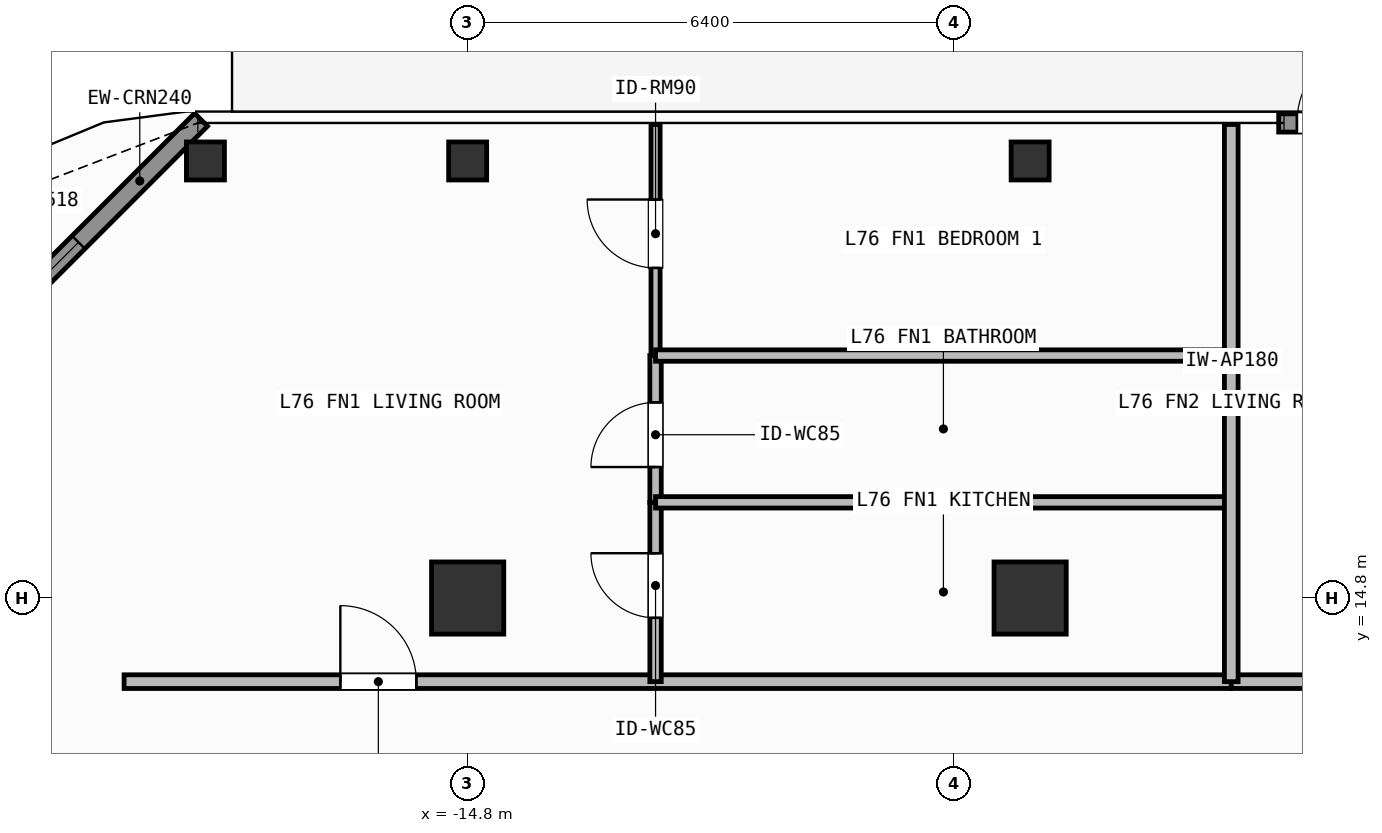
"""IFC4 building model, lengths in metres.
Left out: names, types, materials, properties, quantities, classifications, styles, units other than length and angle.
Written with IfcOpenShell. Run it as: python <this file> out.ifc"""

import sys

from ifc_helpers import new_model, si_unit, direction, frame, frame_2d, origin, origin_2d, place, context, subcontext, project, spatial, rectangle, hollow_rectangle, extrude, element, fill, save


model = new_model("IFC4")
c1 = context("Model", 3, precision=1e-05, world=origin(), true_north=direction((0.0, 1.0)))
c2 = subcontext(c1, "Body", "Model", "MODEL_VIEW")
j1 = project(units=[si_unit("LENGTHUNIT", "METRE"), si_unit("PLANEANGLEUNIT", "RADIAN")], contexts=[c1])
p1 = place(None, origin())
s1 = spatial("IfcSite", under=j1, at=p1, CompositionType="ELEMENT")
p2 = place(p1, origin())
s2 = spatial("IfcBuilding", under=s1, at=p2, CompositionType="ELEMENT")
p3 = place(p2, frame((0.0, 0.0, 309.3)))
s3 = spatial("IfcBuildingStorey", under=s2, at=p3, CompositionType="ELEMENT", Elevation=309.3)
for number, where, z_axis, x_axis in (
    (1, (-14.8, 14.8, 0.0), (0.0, 0.0, 1.0), (1.0, 0.0, 0.0)),
    (2, (-7.4, 14.8, 0.0), (0.0, 0.0, 1.0), (1.0, 0.0, 0.0)),
):
    element("IfcColumn", number, at=place(p3, frame(where, z_axis=z_axis, x_axis=x_axis)), inside=s3, PredefinedType="COLUMN", context=c2, shape_type="SweptSolid", body=[
        extrude(rectangle(XDim=0.95, YDim=0.95, at=origin_2d()), origin(), (0.0, 0.0, 1.0), 3.9),
    ])
for number, where, z_axis, x_axis in (
    (3, (-18.25, 20.55, 0.0), (0.0, 0.0, 1.0), (1.0, 0.0, 0.0)),
    (4, (-14.8, 20.55, 0.0), (0.0, 0.0, 1.0), (1.0, 0.0, 0.0)),
    (5, (-7.4, 20.55, 0.0), (0.0, 0.0, 1.0), (1.0, 0.0, 0.0)),
):
    element("IfcColumn", number, at=place(p3, frame(where, z_axis=z_axis, x_axis=x_axis)), inside=s3, PredefinedType="COLUMN", context=c2, shape_type="SweptSolid", body=[
        extrude(hollow_rectangle(XDim=0.5, YDim=0.5, WallThickness=0.025, at=origin_2d()), origin(), (0.0, 0.0, 1.0), 3.9),
    ])
p4 = place(p3, frame((-4.13, 21.05, 0.0), z_axis=(0.0, 0.0, 1.0), x_axis=(1.0, 0.0, 0.0)))
e6 = element("IfcWall", 6, at=p4, inside=s3, PredefinedType="SOLIDWALL", context=c2, shape_type="SweptSolid", body=[
    extrude(rectangle(XDim=1.58, YDim=0.24, at=frame_2d((0.79, 0.0))), origin(), (0.0, 0.0, 1.0), 3.64),
])
p5 = place(p4, frame((0.24, 0.0, 0.0)))
e7 = element("IfcOpeningElement", 7, at=p5, cuts=e6, PredefinedType="OPENING", context=c2, shape_type="SweptSolid", body=[
    extrude(rectangle(XDim=1.1, YDim=2.2, at=frame_2d((0.55, 1.1))), frame((0.0, 0.13, 0.0), z_axis=(0.0, -1.0, 0.0), x_axis=(1.0, 0.0, 0.0)), (0.0, 0.0, 1.0), 0.26),
])
p6 = place(p3, frame((-22.592, 16.808, 0.0), z_axis=(0.0, 0.0, 1.0), x_axis=(0.707106781187, 0.707106781187, 0.0)))
e8 = element("IfcWall", 8, at=p6, inside=s3, PredefinedType="SOLIDWALL", context=c2, shape_type="SweptSolid", body=[
    extrude(rectangle(XDim=6.059, YDim=0.24, at=frame_2d((3.03, 0.0))), origin(), (0.0, 0.0, 1.0), 3.64),
])
p7 = place(p6, frame((2.28, 0.0, 0.8)))
e9 = element("IfcOpeningElement", 9, at=p7, cuts=e8, PredefinedType="OPENING", context=c2, shape_type="SweptSolid", body=[
    extrude(rectangle(XDim=1.5, YDim=1.85, at=frame_2d((0.75, 0.925))), frame((0.0, 0.13, 0.0), z_axis=(0.0, -1.0, 0.0), x_axis=(1.0, 0.0, 0.0)), (0.0, 0.0, 1.0), 0.26),
])
p8 = place(p3, frame((-19.32, 13.7, 0.0), z_axis=(0.0, 0.0, 1.0), x_axis=(1.0, 0.0, 0.0)))
e10 = element("IfcWall", 10, at=p8, inside=s3, PredefinedType="PARTITIONING", context=c2, shape_type="SweptSolid", body=[
    extrude(rectangle(XDim=14.566, YDim=0.18, at=frame_2d((7.283, 0.0))), origin(), (0.0, 0.0, 1.0), 3.64),
])
p9 = place(p8, frame((2.845, 0.0, 0.0)))
e11 = element("IfcOpeningElement", 11, at=p9, cuts=e10, PredefinedType="OPENING", context=c2, shape_type="SweptSolid", body=[
    extrude(rectangle(XDim=1.0, YDim=2.2, at=frame_2d((0.5, 1.1))), frame((0.0, 0.1, 0.0), z_axis=(0.0, -1.0, 0.0), x_axis=(1.0, 0.0, 0.0)), (0.0, 0.0, 1.0), 0.2),
])
p10 = place(p3, frame((-12.328, 13.7, 0.0), z_axis=(0.0, 0.0, 1.0), x_axis=(0.0, 1.0, 0.0)))
e12 = element("IfcWall", 12, at=p10, inside=s3, PredefinedType="PARTITIONING", context=c2, shape_type="SweptSolid", body=[
    extrude(rectangle(XDim=2.359, YDim=0.15, at=frame_2d((1.18, 0.0))), origin(), (0.0, 0.0, 1.0), 3.64),
])
p11 = place(p10, frame((0.839, 0.0, 0.0)))
e13 = element("IfcOpeningElement", 13, at=p11, cuts=e12, PredefinedType="OPENING", context=c2, shape_type="SweptSolid", body=[
    extrude(rectangle(XDim=0.85, YDim=2.1, at=frame_2d((0.425, 1.05))), frame((0.0, 0.085, 0.0), z_axis=(0.0, -1.0, 0.0), x_axis=(1.0, 0.0, 0.0)), (0.0, 0.0, 1.0), 0.17),
])
p12 = place(p3, frame((-12.328, 16.059, 0.0), z_axis=(0.0, 0.0, 1.0), x_axis=(0.0, 1.0, 0.0)))
e14 = element("IfcWall", 14, at=p12, inside=s3, PredefinedType="PARTITIONING", context=c2, shape_type="SweptSolid", body=[
    extrude(rectangle(XDim=1.931, YDim=0.15, at=frame_2d((0.965, 0.0))), origin(), (0.0, 0.0, 1.0), 3.64),
])
p13 = place(p12, frame((0.464, 0.0, 0.0)))
e15 = element("IfcOpeningElement", 15, at=p13, cuts=e14, PredefinedType="OPENING", context=c2, shape_type="SweptSolid", body=[
    extrude(rectangle(XDim=0.85, YDim=2.1, at=frame_2d((0.425, 1.05))), frame((0.0, 0.085, 0.0), z_axis=(0.0, -1.0, 0.0), x_axis=(1.0, 0.0, 0.0)), (0.0, 0.0, 1.0), 0.17),
])
p14 = place(p3, frame((-12.328, 17.99, 0.0), z_axis=(0.0, 0.0, 1.0), x_axis=(0.0, 1.0, 0.0)))
e16 = element("IfcWall", 16, at=p14, inside=s3, PredefinedType="PARTITIONING", context=c2, shape_type="SweptSolid", body=[
    extrude(rectangle(XDim=3.04, YDim=0.12, at=frame_2d((1.52, 0.0))), origin(), (0.0, 0.0, 1.0), 3.64),
])
p15 = place(p14, frame((1.153, 0.0, 0.0)))
e17 = element("IfcOpeningElement", 17, at=p15, cuts=e16, PredefinedType="OPENING", context=c2, shape_type="SweptSolid", body=[
    extrude(rectangle(XDim=0.9, YDim=2.1, at=frame_2d((0.45, 1.05))), frame((0.0, 0.07, 0.0), z_axis=(0.0, -1.0, 0.0), x_axis=(1.0, 0.0, 0.0)), (0.0, 0.0, 1.0), 0.14),
])
p16 = place(p3, frame((-4.754, 13.7, 0.0), z_axis=(0.0, 0.0, 1.0), x_axis=(1.0, 0.0, 0.0)))
e18 = element("IfcWall", 18, at=p16, inside=s3, PredefinedType="PARTITIONING", context=c2, shape_type="SweptSolid", body=[
    extrude(rectangle(XDim=7.659, YDim=0.18, at=frame_2d((3.83, 0.0))), origin(), (0.0, 0.0, 1.0), 3.64),
])
p17 = place(p16, frame((1.393, 0.0, 0.0)))
e19 = element("IfcOpeningElement", 19, at=p17, cuts=e18, PredefinedType="OPENING", context=c2, shape_type="SweptSolid", body=[
    extrude(rectangle(XDim=1.0, YDim=2.2, at=frame_2d((0.5, 1.1))), frame((0.0, 0.1, 0.0), z_axis=(0.0, -1.0, 0.0), x_axis=(1.0, 0.0, 0.0)), (0.0, 0.0, 1.0), 0.2),
])
for number, where, z_axis, x_axis in (
    (20, (-12.328, 16.059, 0.0), (0.0, 0.0, 1.0), (1.0, 0.0, 0.0)),
    (21, (-12.328, 17.99, 0.0), (0.0, 0.0, 1.0), (1.0, 0.0, 0.0)),
):
    element("IfcWall", number, at=place(p3, frame(where, z_axis=z_axis, x_axis=x_axis)), inside=s3, PredefinedType="PARTITIONING", context=c2, shape_type="SweptSolid", body=[
        extrude(rectangle(XDim=7.574, YDim=0.15, at=frame_2d((3.787, 0.0))), origin(), (0.0, 0.0, 1.0), 3.64),
    ])
p18 = place(p3, frame((-4.754, 13.7, 0.0), z_axis=(0.0, 0.0, 1.0), x_axis=(0.0, 1.0, 0.0)))
e22 = element("IfcWall", 22, at=p18, inside=s3, PredefinedType="PARTITIONING", context=c2, shape_type="SweptSolid", body=[
    extrude(rectangle(XDim=7.33, YDim=0.18, at=frame_2d((3.665, 0.0))), origin(), (0.0, 0.0, 1.0), 3.64),
])
p19 = place(p5, origin())
e23 = element("IfcDoor", 23, at=p19, inside=s3, OperationType="SINGLE_SWING_RIGHT", PredefinedType="DOOR", context=c2, shape_type="SweptSolid", body=[
    extrude(rectangle(XDim=1.1, YDim=2.2, at=frame_2d((0.55, 1.1))), frame((0.0, 0.025, 0.0), z_axis=(0.0, -1.0, 0.0), x_axis=(1.0, 0.0, 0.0)), (0.0, 0.0, 1.0), 0.05),
])
fill(e7, e23)
p20 = place(p7, origin())
e24 = element("IfcWindow", 24, at=p20, inside=s3, PartitioningType="SINGLE_PANEL", PredefinedType="WINDOW", context=c2, shape_type="SweptSolid", body=[
    extrude(rectangle(XDim=1.5, YDim=1.85, at=frame_2d((0.75, 0.925))), frame((0.0, 0.03, 0.0), z_axis=(0.0, -1.0, 0.0), x_axis=(1.0, 0.0, 0.0)), (0.0, 0.0, 1.0), 0.06),
])
fill(e9, e24)
p21 = place(p9, origin())
e25 = element("IfcDoor", 25, at=p21, inside=s3, OperationType="SINGLE_SWING_LEFT", PredefinedType="DOOR", context=c2, shape_type="SweptSolid", body=[
    extrude(rectangle(XDim=1.0, YDim=2.2, at=frame_2d((0.5, 1.1))), frame((0.0, 0.025, 0.0), z_axis=(0.0, -1.0, 0.0), x_axis=(1.0, 0.0, 0.0)), (0.0, 0.0, 1.0), 0.05),
])
fill(e11, e25)
p22 = place(p11, origin())
e26 = element("IfcDoor", 26, at=p22, inside=s3, OperationType="SINGLE_SWING_RIGHT", PredefinedType="DOOR", context=c2, shape_type="SweptSolid", body=[
    extrude(rectangle(XDim=0.85, YDim=2.1, at=frame_2d((0.425, 1.05))), frame((0.0, 0.025, 0.0), z_axis=(0.0, -1.0, 0.0), x_axis=(1.0, 0.0, 0.0)), (0.0, 0.0, 1.0), 0.05),
])
fill(e13, e26)
p23 = place(p13, origin())
e27 = element("IfcDoor", 27, at=p23, inside=s3, OperationType="SINGLE_SWING_LEFT", PredefinedType="DOOR", context=c2, shape_type="SweptSolid", body=[
    extrude(rectangle(XDim=0.85, YDim=2.1, at=frame_2d((0.425, 1.05))), frame((0.0, 0.025, 0.0), z_axis=(0.0, -1.0, 0.0), x_axis=(1.0, 0.0, 0.0)), (0.0, 0.0, 1.0), 0.05),
])
fill(e15, e27)
p24 = place(p15, origin())
e28 = element("IfcDoor", 28, at=p24, inside=s3, OperationType="SINGLE_SWING_RIGHT", PredefinedType="DOOR", context=c2, shape_type="SweptSolid", body=[
    extrude(rectangle(XDim=0.9, YDim=2.1, at=frame_2d((0.45, 1.05))), frame((0.0, 0.025, 0.0), z_axis=(0.0, -1.0, 0.0), x_axis=(1.0, 0.0, 0.0)), (0.0, 0.0, 1.0), 0.05),
])
fill(e17, e28)
save(model, sys.argv[1])
